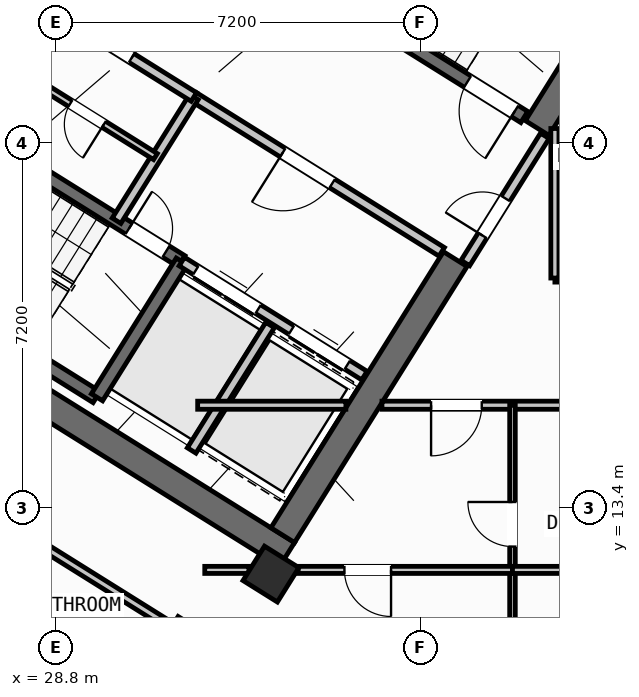
"""IFC4 building model, lengths in metres.
Left out: names, types, materials, properties, quantities, classifications, styles, units other than length and angle.
Written with IfcOpenShell. Run it as: python <this file> out.ifc"""

import sys

from ifc_helpers import new_model, si_unit, direction, frame, frame_2d, origin, origin_2d, place, context, subcontext, project, spatial, rectangle, hollow_rectangle, extrude, source, transform, mapped, element, fill, save


model = new_model("IFC4")
c1 = context("Model", 3, precision=1e-05, world=origin(), true_north=direction((0.0, 1.0)))
c2 = subcontext(c1, "Body", "Model", "MODEL_VIEW")
j1 = project(units=[si_unit("LENGTHUNIT", "METRE"), si_unit("PLANEANGLEUNIT", "RADIAN")], contexts=[c1])
p1 = place(None, origin())
s1 = spatial("IfcSite", under=j1, at=p1, CompositionType="ELEMENT")
p2 = place(p1, origin())
s2 = spatial("IfcBuilding", under=s1, at=p2, CompositionType="ELEMENT")
p3 = place(p2, frame((0.0, 0.0, 174.9)))
s3 = spatial("IfcBuildingStorey", under=s2, at=p3, CompositionType="ELEMENT", Elevation=174.9)
p4 = place(p3, frame((33.366, 12.477, 0.0), z_axis=(0.0, 0.0, 1.0), x_axis=(-0.848047359947, 0.529920442413, 0.0)))
e1 = element("IfcWall", 1, at=p4, inside=s3, PredefinedType="SHEAR", context=c2, shape_type="SweptSolid", body=[
    extrude(rectangle(XDim=13.14, YDim=0.55, at=frame_2d((6.57, 0.0))), origin(), (0.0, 0.0, 1.0), 4.22),
])
p5 = place(p3, frame((40.194, 23.922, 0.0), z_axis=(0.0, 0.0, 1.0), x_axis=(-0.529888438328, -0.848067357541, 0.0)))
e2 = element("IfcWall", 2, at=p5, inside=s3, PredefinedType="SHEAR", context=c2, shape_type="SweptSolid", body=[
    extrude(rectangle(XDim=3.575, YDim=0.55, at=frame_2d((1.788, 0.0))), origin(), (0.0, 0.0, 1.0), 4.22),
])
p6 = place(p3, frame((36.683, 18.304, 0.0), z_axis=(0.0, 0.0, 1.0), x_axis=(-0.529896466841, -0.848062341122, 0.0)))
e3 = element("IfcWall", 3, at=p6, inside=s3, PredefinedType="SHEAR", context=c2, shape_type="SweptSolid", body=[
    extrude(rectangle(XDim=6.425, YDim=0.55, at=frame_2d((3.212, 0.0))), origin(), (0.0, 0.0, 1.0), 4.22),
])
m1 = source(origin(), c2, "Body", "SweptSolid", [
    extrude(hollow_rectangle(XDim=0.8, YDim=0.8, WallThickness=0.032, at=origin_2d()), origin(), (0.0, 0.0, 1.0), 4.5),
])
p7 = place(p3, frame((33.046, 12.087, 0.0), z_axis=(0.0, 0.0, 1.0), x_axis=(-0.848048096156, 0.529919264233, 0.0)))
e4 = element("IfcColumn", 4, at=p7, inside=s3, PredefinedType="COLUMN", context=c2, shape_type="MappedRepresentation", body=[
    mapped(m1, transform((0.0, 0.0, 0.0), scale=1.0)),
])
p8 = place(p3, frame((29.268, 6.429, 0.0), z_axis=(0.0, 0.0, 1.0), x_axis=(-0.848049971435, 0.529916263149, 0.0)))
e5 = element("IfcWall", 5, at=p8, inside=s3, PredefinedType="STANDARD", context=c2, shape_type="SweptSolid", body=[
    extrude(rectangle(XDim=31.588, YDim=0.32, at=frame_2d((15.794, 0.0))), origin(), (0.0, 0.0, 1.0), 4.22),
])
p9 = place(p8, frame((27.641, 0.0, 0.0)))
e6 = element("IfcOpeningElement", 6, at=p9, cuts=e5, PredefinedType="OPENING", context=c2, shape_type="SweptSolid", body=[
    extrude(rectangle(XDim=1.2, YDim=2.15, at=frame_2d((0.6, 1.075))), frame((0.0, 0.17, 0.0), z_axis=(0.0, -1.0, 0.0), x_axis=(1.0, 0.0, 0.0)), (0.0, 0.0, 1.0), 0.34),
])
p10 = place(p8, frame((2.954, 0.0, 0.8)))
e7 = element("IfcOpeningElement", 7, at=p10, cuts=e5, PredefinedType="OPENING", context=c2, shape_type="SweptSolid", body=[
    extrude(rectangle(XDim=2.1, YDim=1.55, at=frame_2d((1.05, 0.775))), frame((0.0, 0.17, 0.0), z_axis=(0.0, -1.0, 0.0), x_axis=(1.0, 0.0, 0.0)), (0.0, 0.0, 1.0), 0.34),
])
p11 = place(p8, frame((8.253, 0.0, 0.8)))
e8 = element("IfcOpeningElement", 8, at=p11, cuts=e5, PredefinedType="OPENING", context=c2, shape_type="SweptSolid", body=[
    extrude(rectangle(XDim=2.1, YDim=1.55, at=frame_2d((1.05, 0.775))), frame((0.0, 0.17, 0.0), z_axis=(0.0, -1.0, 0.0), x_axis=(1.0, 0.0, 0.0)), (0.0, 0.0, 1.0), 0.34),
])
p12 = place(p8, frame((20.2, 0.0, 1.0)))
e9 = element("IfcOpeningElement", 9, at=p12, cuts=e5, PredefinedType="OPENING", context=c2, shape_type="SweptSolid", body=[
    extrude(rectangle(XDim=0.9, YDim=1.25, at=frame_2d((0.45, 0.625))), frame((0.0, 0.17, 0.0), z_axis=(0.0, -1.0, 0.0), x_axis=(1.0, 0.0, 0.0)), (0.0, 0.0, 1.0), 0.34),
])
p13 = place(p3, frame((29.605, 15.581, 0.0), z_axis=(0.0, 0.0, 1.0), x_axis=(-0.848036911448, 0.529937163087, 0.0)))
e10 = element("IfcWall", 10, at=p13, inside=s3, PredefinedType="SHEAR", context=c2, shape_type="SweptSolid", body=[
    extrude(rectangle(XDim=7.46, YDim=0.26, at=frame_2d((3.73, 0.0))), origin(), (0.0, 0.0, 1.0), 4.22),
])
p14 = place(p3, frame((31.28, 18.261, 0.0), z_axis=(0.0, 0.0, 1.0), x_axis=(-0.848051618787, 0.529913626805, 0.0)))
e11 = element("IfcWall", 11, at=p14, inside=s3, PredefinedType="SHEAR", context=c2, shape_type="SweptSolid", body=[
    extrude(rectangle(XDim=7.46, YDim=0.26, at=frame_2d((3.73, 0.0))), origin(), (0.0, 0.0, 1.0), 4.22),
])
p15 = place(p14, frame((0.36, 0.0, 0.0)))
e12 = element("IfcOpeningElement", 12, at=p15, cuts=e11, PredefinedType="OPENING", context=c2, shape_type="SweptSolid", body=[
    extrude(rectangle(XDim=0.86, YDim=2.05, at=frame_2d((0.43, 1.025))), frame((0.0, 0.14, 0.0), z_axis=(0.0, -1.0, 0.0), x_axis=(1.0, 0.0, 0.0)), (0.0, 0.0, 1.0), 0.28),
])
p16 = place(p3, frame((31.288, 18.256, 0.0), z_axis=(0.0, 0.0, 1.0), x_axis=(-0.529943379326, -0.848033026897, 0.0)))
e13 = element("IfcWall", 13, at=p16, inside=s3, PredefinedType="SHEAR", context=c2, shape_type="SweptSolid", body=[
    extrude(rectangle(XDim=3.16, YDim=0.26, at=frame_2d((1.58, 0.0))), origin(), (0.0, 0.0, 1.0), 4.22),
])
p17 = place(p3, frame((38.046, 21.108, 0.0), z_axis=(0.0, 0.0, 1.0), x_axis=(-0.848054434086, 0.529909121291, 0.0)))
e14 = element("IfcWall", 14, at=p17, inside=s3, PredefinedType="SHEAR", context=c2, shape_type="SweptSolid", body=[
    extrude(rectangle(XDim=7.33, YDim=0.26, at=frame_2d((3.665, 0.0))), origin(), (0.0, 0.0, 1.0), 4.22),
])
p18 = place(p17, frame((0.22, 0.0, 0.0)))
e15 = element("IfcOpeningElement", 15, at=p18, cuts=e14, PredefinedType="OPENING", context=c2, shape_type="SweptSolid", body=[
    extrude(rectangle(XDim=1.1, YDim=2.1, at=frame_2d((0.55, 1.05))), frame((0.0, 0.14, 0.0), z_axis=(0.0, -1.0, 0.0), x_axis=(1.0, 0.0, 0.0)), (0.0, 0.0, 1.0), 0.28),
])
p19 = place(p3, frame((34.891, 16.005, 0.0), z_axis=(0.0, 0.0, 1.0), x_axis=(-0.848062873452, 0.529895614884, 0.0)))
e16 = element("IfcWall", 16, at=p19, inside=s3, PredefinedType="STANDARD", context=c2, shape_type="SweptSolid", body=[
    extrude(rectangle(XDim=4.248, YDim=0.2, at=frame_2d((2.124, 0.0))), origin(), (0.0, 0.0, 1.0), 4.21),
])
p20 = place(p19, frame((0.398, 0.0, 0.0)))
e17 = element("IfcOpeningElement", 17, at=p20, cuts=e16, PredefinedType="OPENING", context=c2, shape_type="SweptSolid", body=[
    extrude(rectangle(XDim=1.3, YDim=2.2, at=frame_2d((0.65, 1.1))), frame((0.0, 0.11, 0.0), z_axis=(0.0, -1.0, 0.0), x_axis=(1.0, 0.0, 0.0)), (0.0, 0.0, 1.0), 0.22),
])
p21 = place(p19, frame((2.473, 0.0, 0.0)))
e18 = element("IfcOpeningElement", 18, at=p21, cuts=e16, PredefinedType="OPENING", context=c2, shape_type="SweptSolid", body=[
    extrude(rectangle(XDim=1.45, YDim=2.25, at=frame_2d((0.725, 1.125))), frame((0.0, 0.11, 0.0), z_axis=(0.0, -1.0, 0.0), x_axis=(1.0, 0.0, 0.0)), (0.0, 0.0, 1.0), 0.22),
])
p22 = place(p3, frame((36.417, 18.447, 0.0), z_axis=(0.0, 0.0, 1.0), x_axis=(-0.848064879198, 0.529892404805, 0.0)))
e19 = element("IfcWall", 19, at=p22, inside=s3, PredefinedType="STANDARD", context=c2, shape_type="SweptSolid", body=[
    extrude(rectangle(XDim=5.768, YDim=0.2, at=frame_2d((2.884, 0.0))), origin(), (0.0, 0.0, 1.0), 4.21),
])
p23 = place(p22, frame((2.548, 0.0, 0.0)))
e20 = element("IfcOpeningElement", 20, at=p23, cuts=e19, PredefinedType="OPENING", context=c2, shape_type="SweptSolid", body=[
    extrude(rectangle(XDim=1.15, YDim=2.1, at=frame_2d((0.575, 1.05))), frame((0.0, 0.11, 0.0), z_axis=(0.0, -1.0, 0.0), x_axis=(1.0, 0.0, 0.0)), (0.0, 0.0, 1.0), 0.22),
])
p24 = place(p3, frame((33.029, 17.003, 0.0), z_axis=(0.0, 0.0, 1.0), x_axis=(-0.529916267533, -0.848049968695, 0.0)))
e21 = element("IfcWall", 21, at=p24, inside=s3, PredefinedType="STANDARD", context=c2, shape_type="SweptSolid", body=[
    extrude(rectangle(XDim=2.92, YDim=0.2, at=frame_2d((1.46, 0.0))), origin(), (0.0, 0.0, 1.0), 4.21),
])
for number, where, z_axis, x_axis in (
    (22, (31.525, 21.504, 0.0), (0.0, 0.0, 1.0), (-0.53, -0.848, 0.0)),
    (23, (28.71, 23.263, 0.0), (0.0, 0.0, 1.0), (-0.53, -0.848, 0.0)),
):
    element("IfcWall", number, at=place(p3, frame(where, z_axis=z_axis, x_axis=x_axis)), inside=s3, PredefinedType="STANDARD", context=c2, shape_type="SweptSolid", body=[
        extrude(rectangle(XDim=2.88, YDim=0.2, at=frame_2d((1.44, 0.0))), origin(), (0.0, 0.0, 1.0), 4.21),
    ])
p25 = place(p3, frame((31.525, 21.504, 0.0), z_axis=(0.0, 0.0, 1.0), x_axis=(-0.848040211232, 0.529931882541, 0.0)))
e24 = element("IfcWall", 24, at=p25, inside=s3, PredefinedType="STANDARD", context=c2, shape_type="SweptSolid", body=[
    extrude(rectangle(XDim=6.218, YDim=0.2, at=frame_2d((3.109, 0.0))), origin(), (0.0, 0.0, 1.0), 4.21),
])
p26 = place(p25, frame((4.4, 0.0, 0.0)))
e25 = element("IfcOpeningElement", 25, at=p26, cuts=e24, PredefinedType="OPENING", context=c2, shape_type="SweptSolid", body=[
    extrude(rectangle(XDim=0.86, YDim=2.05, at=frame_2d((0.43, 1.025))), frame((0.0, 0.11, 0.0), z_axis=(0.0, -1.0, 0.0), x_axis=(1.0, 0.0, 0.0)), (0.0, 0.0, 1.0), 0.22),
])
p27 = place(p25, frame((1.45, 0.0, 0.0)))
e26 = element("IfcOpeningElement", 26, at=p27, cuts=e24, PredefinedType="OPENING", context=c2, shape_type="SweptSolid", body=[
    extrude(rectangle(XDim=0.86, YDim=2.05, at=frame_2d((0.43, 1.025))), frame((0.0, 0.11, 0.0), z_axis=(0.0, -1.0, 0.0), x_axis=(1.0, 0.0, 0.0)), (0.0, 0.0, 1.0), 0.22),
])
p28 = place(p3, frame((30.766, 20.327, 0.0), z_axis=(0.0, 0.0, 1.0), x_axis=(-0.848052663127, 0.529911955482, 0.0)))
e27 = element("IfcWall", 27, at=p28, inside=s3, PredefinedType="PLUMBINGWALL", context=c2, shape_type="SweptSolid", body=[
    extrude(rectangle(XDim=3.28, YDim=0.14, at=frame_2d((1.64, 0.0))), origin(), (0.0, 0.0, 1.0), 4.21),
])
p29 = place(p28, frame((1.2, 0.0, 0.0)))
e28 = element("IfcOpeningElement", 28, at=p29, cuts=e27, PredefinedType="OPENING", context=c2, shape_type="SweptSolid", body=[
    extrude(rectangle(XDim=0.78, YDim=2.05, at=frame_2d((0.39, 1.025))), frame((0.0, 0.08, 0.0), z_axis=(0.0, -1.0, 0.0), x_axis=(1.0, 0.0, 0.0)), (0.0, 0.0, 1.0), 0.16),
])
p30 = place(p3, frame((32.164, 10.374, 0.0), z_axis=(0.0, 0.0, 1.0), x_axis=(-0.848044107957, 0.529925646633, 0.0)))
e29 = element("IfcWall", 29, at=p30, inside=s3, PredefinedType="PARTITIONING", context=c2, shape_type="SweptSolid", body=[
    extrude(rectangle(XDim=15.57, YDim=0.16, at=frame_2d((7.785, 0.0))), origin(), (0.0, 0.0, 1.0), 4.21),
])
p31 = place(p30, frame((10.83, 0.0, 0.0)))
e30 = element("IfcOpeningElement", 30, at=p31, cuts=e29, PredefinedType="OPENING", context=c2, shape_type="SweptSolid", body=[
    extrude(rectangle(XDim=1.0, YDim=2.1, at=frame_2d((0.5, 1.05))), frame((0.0, 0.09, 0.0), z_axis=(0.0, -1.0, 0.0), x_axis=(1.0, 0.0, 0.0)), (0.0, 0.0, 1.0), 0.18),
])
p32 = place(p3, frame((31.282, 11.208, 0.0), z_axis=(0.0, 0.0, 1.0), x_axis=(-0.529938869374, -0.84803584519, 0.0)))
e31 = element("IfcWall", 31, at=p32, inside=s3, PredefinedType="PARTITIONING", context=c2, shape_type="SweptSolid", body=[
    extrude(rectangle(XDim=5.48, YDim=0.16, at=frame_2d((2.74, 0.0))), origin(), (0.0, 0.0, 1.0), 4.21),
])
p33 = place(p3, frame((29.72, 8.859, 0.0), z_axis=(0.0, 0.0, 1.0), x_axis=(-0.848049134363, 0.529917602752, 0.0)))
e32 = element("IfcWall", 32, at=p33, inside=s3, PredefinedType="PLUMBINGWALL", context=c2, shape_type="SweptSolid", body=[
    extrude(rectangle(XDim=14.3, YDim=0.14, at=frame_2d((7.15, 0.0))), origin(), (0.0, 0.0, 1.0), 4.21),
])
p34 = place(p33, frame((9.57, 0.0, 0.0)))
e33 = element("IfcOpeningElement", 33, at=p34, cuts=e32, PredefinedType="OPENING", context=c2, shape_type="SweptSolid", body=[
    extrude(rectangle(XDim=0.92, YDim=2.08, at=frame_2d((0.46, 1.04))), frame((0.0, 0.08, 0.0), z_axis=(0.0, -1.0, 0.0), x_axis=(1.0, 0.0, 0.0)), (0.0, 0.0, 1.0), 0.16),
])
p35 = place(p3, frame((38.451, 20.737, 0.0), z_axis=(0.0, 0.0, 1.0), x_axis=(-0.529924799939, -0.848044637038, 0.0)))
e34 = element("IfcWall", 34, at=p35, inside=s3, PredefinedType="STANDARD", context=c2, shape_type="SweptSolid", body=[
    extrude(rectangle(XDim=2.96, YDim=0.2, at=frame_2d((1.48, 0.0))), origin(), (0.0, 0.0, 1.0), 2.395),
])
p36 = place(p35, frame((1.46, 0.0, 0.0)))
e35 = element("IfcOpeningElement", 35, at=p36, cuts=e34, PredefinedType="OPENING", context=c2, shape_type="SweptSolid", body=[
    extrude(rectangle(XDim=0.86, YDim=2.05, at=frame_2d((0.43, 1.025))), frame((0.0, 0.11, 0.0), z_axis=(0.0, -1.0, 0.0), x_axis=(1.0, 0.0, 0.0)), (0.0, 0.0, 1.0), 0.22),
])
p37 = place(p3, frame((31.6, 15.42, 0.0), z_axis=(0.0, 0.0, 1.0), x_axis=(1.0, 0.0, 0.0)))
e36 = element("IfcWall", 36, at=p37, inside=s3, PredefinedType="PARTITIONING", context=c2, shape_type="SweptSolid", body=[
    extrude(rectangle(XDim=2.925, YDim=0.16, at=frame_2d((1.462, 0.0))), origin(), (0.0, 0.0, 1.0), 4.21),
])
p38 = place(p3, frame((35.237, 15.42, 0.0), z_axis=(0.0, 0.0, 1.0), x_axis=(1.0, 0.0, 0.0)))
e37 = element("IfcWall", 37, at=p38, inside=s3, PredefinedType="PARTITIONING", context=c2, shape_type="SweptSolid", body=[
    extrude(rectangle(XDim=15.432, YDim=0.16, at=frame_2d((7.716, 0.0))), origin(), (0.0, 0.0, 1.0), 4.21),
])
p39 = place(p38, frame((0.969, 0.0, 0.0)))
e38 = element("IfcOpeningElement", 38, at=p39, cuts=e37, PredefinedType="OPENING", context=c2, shape_type="SweptSolid", body=[
    extrude(rectangle(XDim=1.0, YDim=2.1, at=frame_2d((0.5, 1.05))), frame((0.0, 0.09, 0.0), z_axis=(0.0, -1.0, 0.0), x_axis=(1.0, 0.0, 0.0)), (0.0, 0.0, 1.0), 0.18),
])
p40 = place(p38, frame((8.799, 0.0, 0.0)))
e39 = element("IfcOpeningElement", 39, at=p40, cuts=e37, PredefinedType="OPENING", context=c2, shape_type="SweptSolid", body=[
    extrude(rectangle(XDim=1.0, YDim=2.1, at=frame_2d((0.5, 1.05))), frame((0.0, 0.09, 0.0), z_axis=(0.0, -1.0, 0.0), x_axis=(1.0, 0.0, 0.0)), (0.0, 0.0, 1.0), 0.18),
])
p41 = place(p3, frame((38.65, 17.93, 0.0), z_axis=(0.0, 0.0, 1.0), x_axis=(1.0, 0.0, 0.0)))
e40 = element("IfcWall", 40, at=p41, inside=s3, PredefinedType="PARTITIONING", context=c2, shape_type="SweptSolid", body=[
    extrude(rectangle(XDim=9.95, YDim=0.16, at=frame_2d((4.975, 0.0))), origin(), (0.0, 0.0, 1.0), 4.21),
])
p42 = place(p41, frame((4.475, 0.0, 0.0)))
e41 = element("IfcOpeningElement", 41, at=p42, cuts=e40, PredefinedType="OPENING", context=c2, shape_type="SweptSolid", body=[
    extrude(rectangle(XDim=1.0, YDim=2.1, at=frame_2d((0.5, 1.05))), frame((0.0, 0.09, 0.0), z_axis=(0.0, -1.0, 0.0), x_axis=(1.0, 0.0, 0.0)), (0.0, 0.0, 1.0), 0.18),
])
p43 = place(p3, frame((38.65, 17.93, 0.0), z_axis=(0.0, 0.0, 1.0), x_axis=(0.0, 1.0, 0.0)))
e42 = element("IfcWall", 42, at=p43, inside=s3, PredefinedType="PARTITIONING", context=c2, shape_type="SweptSolid", body=[
    extrude(rectangle(XDim=2.951, YDim=0.16, at=frame_2d((1.476, 0.0))), origin(), (0.0, 0.0, 1.0), 4.21),
])
p44 = place(p3, frame((37.813, 1.96, 0.0), z_axis=(0.0, 0.0, 1.0), x_axis=(0.0, 1.0, 0.0)))
e43 = element("IfcWall", 43, at=p44, inside=s3, PredefinedType="PARTITIONING", context=c2, shape_type="SweptSolid", body=[
    extrude(rectangle(XDim=13.46, YDim=0.11, at=frame_2d((6.73, 0.0))), origin(), (0.0, 0.0, 1.0), 4.21),
])
p45 = place(p44, frame((5.5, 0.0, 0.0)))
e44 = element("IfcOpeningElement", 44, at=p45, cuts=e43, PredefinedType="OPENING", context=c2, shape_type="SweptSolid", body=[
    extrude(rectangle(XDim=0.92, YDim=2.08, at=frame_2d((0.46, 1.04))), frame((0.0, 0.065, 0.0), z_axis=(0.0, -1.0, 0.0), x_axis=(1.0, 0.0, 0.0)), (0.0, 0.0, 1.0), 0.13),
])
p46 = place(p44, frame((10.67, 0.0, 0.0)))
e45 = element("IfcOpeningElement", 45, at=p46, cuts=e43, PredefinedType="OPENING", context=c2, shape_type="SweptSolid", body=[
    extrude(rectangle(XDim=0.88, YDim=2.08, at=frame_2d((0.44, 1.04))), frame((0.0, 0.065, 0.0), z_axis=(0.0, -1.0, 0.0), x_axis=(1.0, 0.0, 0.0)), (0.0, 0.0, 1.0), 0.13),
])
p47 = place(p3, frame((31.74, 12.17, 0.0), z_axis=(0.0, 0.0, 1.0), x_axis=(1.0, 0.0, 0.0)))
e46 = element("IfcWall", 46, at=p47, inside=s3, PredefinedType="PLUMBINGWALL", context=c2, shape_type="SweptSolid", body=[
    extrude(rectangle(XDim=0.872, YDim=0.14, at=frame_2d((0.436, 0.0))), origin(), (0.0, 0.0, 1.0), 4.21),
])
p48 = place(p3, frame((33.584, 12.17, 0.0), z_axis=(0.0, 0.0, 1.0), x_axis=(1.0, 0.0, 0.0)))
e47 = element("IfcWall", 47, at=p48, inside=s3, PredefinedType="PLUMBINGWALL", context=c2, shape_type="SweptSolid", body=[
    extrude(rectangle(XDim=4.229, YDim=0.14, at=frame_2d((2.115, 0.0))), origin(), (0.0, 0.0, 1.0), 3.395),
])
p49 = place(p48, frame((0.913, 0.0, 0.0)))
e48 = element("IfcOpeningElement", 48, at=p49, cuts=e47, PredefinedType="OPENING", context=c2, shape_type="SweptSolid", body=[
    extrude(rectangle(XDim=0.92, YDim=2.08, at=frame_2d((0.46, 1.04))), frame((0.0, 0.08, 0.0), z_axis=(0.0, -1.0, 0.0), x_axis=(1.0, 0.0, 0.0)), (0.0, 0.0, 1.0), 0.16),
])
p50 = place(p3, frame((37.813, 12.17, 0.0), z_axis=(0.0, 0.0, 1.0), x_axis=(1.0, 0.0, 0.0)))
e49 = element("IfcWall", 49, at=p50, inside=s3, PredefinedType="PLUMBINGWALL", context=c2, shape_type="SweptSolid", body=[
    extrude(rectangle(XDim=4.137, YDim=0.14, at=frame_2d((2.068, 0.0))), origin(), (0.0, 0.0, 1.0), 3.395),
])
m2 = source(origin(), c2, "Body", "SweptSolid", [
    extrude(rectangle(XDim=0.86, YDim=2.05, at=frame_2d((0.43, 1.025))), frame((0.0, 0.025, 0.0), z_axis=(0.0, -1.0, 0.0), x_axis=(1.0, 0.0, 0.0)), (0.0, 0.0, 1.0), 0.05),
])
p51 = place(p15, frame((0.86, 0.0, 0.0), z_axis=(0.0, 0.0, 1.0), x_axis=(-1.0, 0.0, 0.0)))
e50 = element("IfcDoor", 50, at=p51, inside=s3, OperationType="SINGLE_SWING_LEFT", PredefinedType="DOOR", context=c2, shape_type="MappedRepresentation", body=[
    mapped(m2, transform((0.0, 0.0, 0.0), scale=1.0)),
])
fill(e12, e50)
m3 = source(origin(), c2, "Body", "SweptSolid", [
    extrude(rectangle(XDim=1.1, YDim=2.1, at=frame_2d((0.55, 1.05))), frame((0.0, 0.025, 0.0), z_axis=(0.0, -1.0, 0.0), x_axis=(1.0, 0.0, 0.0)), (0.0, 0.0, 1.0), 0.05),
])
p52 = place(p18, origin())
e51 = element("IfcDoor", 51, at=p52, inside=s3, OperationType="SINGLE_SWING_LEFT", PredefinedType="DOOR", context=c2, shape_type="MappedRepresentation", body=[
    mapped(m3, transform((0.0, 0.0, 0.0), scale=1.0)),
])
fill(e15, e51)
m4 = source(origin(), c2, "Body", "SweptSolid", [
    extrude(rectangle(XDim=1.15, YDim=2.1, at=frame_2d((0.575, 1.05))), frame((0.0, 0.025, 0.0), z_axis=(0.0, -1.0, 0.0), x_axis=(1.0, 0.0, 0.0)), (0.0, 0.0, 1.0), 0.05),
])
p53 = place(p23, origin())
e52 = element("IfcDoor", 52, at=p53, inside=s3, OperationType="SINGLE_SWING_RIGHT", PredefinedType="DOOR", context=c2, shape_type="MappedRepresentation", body=[
    mapped(m4, transform((0.0, 0.0, 0.0), scale=1.0)),
])
fill(e20, e52)
m5 = source(origin(), c2, "Body", "SweptSolid", [
    extrude(rectangle(XDim=1.3, YDim=2.2, at=frame_2d((0.65, 1.1))), frame((0.0, 0.025, 0.0), z_axis=(0.0, -1.0, 0.0), x_axis=(1.0, 0.0, 0.0)), (0.0, 0.0, 1.0), 0.05),
])
p54 = place(p20, origin())
e53 = element("IfcDoor", 53, at=p54, inside=s3, OperationType="DOUBLE_DOOR_SLIDING", PredefinedType="DOOR", context=c2, shape_type="MappedRepresentation", body=[
    mapped(m5, transform((0.0, 0.0, 0.0), scale=1.0)),
])
fill(e17, e53)
m6 = source(origin(), c2, "Body", "SweptSolid", [
    extrude(rectangle(XDim=1.45, YDim=2.25, at=frame_2d((0.725, 1.125))), frame((0.0, 0.025, 0.0), z_axis=(0.0, -1.0, 0.0), x_axis=(1.0, 0.0, 0.0)), (0.0, 0.0, 1.0), 0.05),
])
p55 = place(p21, origin())
e54 = element("IfcDoor", 54, at=p55, inside=s3, OperationType="DOUBLE_DOOR_SLIDING", PredefinedType="DOOR", context=c2, shape_type="MappedRepresentation", body=[
    mapped(m6, transform((0.0, 0.0, 0.0), scale=1.0)),
])
fill(e18, e54)
p56 = place(p27, frame((0.86, 0.0, 0.0), z_axis=(0.0, 0.0, 1.0), x_axis=(-1.0, 0.0, 0.0)))
e55 = element("IfcDoor", 55, at=p56, inside=s3, OperationType="SINGLE_SWING_RIGHT", PredefinedType="DOOR", context=c2, shape_type="MappedRepresentation", body=[
    mapped(m2, transform((0.0, 0.0, 0.0), scale=1.0)),
])
fill(e26, e55)
m7 = source(origin(), c2, "Body", "SweptSolid", [
    extrude(rectangle(XDim=0.78, YDim=2.05, at=frame_2d((0.39, 1.025))), frame((0.0, 0.025, 0.0), z_axis=(0.0, -1.0, 0.0), x_axis=(1.0, 0.0, 0.0)), (0.0, 0.0, 1.0), 0.05),
])
p57 = place(p29, origin())
e56 = element("IfcDoor", 56, at=p57, inside=s3, OperationType="SINGLE_SWING_LEFT", PredefinedType="DOOR", context=c2, shape_type="MappedRepresentation", body=[
    mapped(m7, transform((0.0, 0.0, 0.0), scale=1.0)),
])
fill(e28, e56)
p58 = place(p36, frame((0.86, 0.0, 0.0), z_axis=(0.0, 0.0, 1.0), x_axis=(-1.0, 0.0, 0.0)))
e57 = element("IfcDoor", 57, at=p58, inside=s3, OperationType="SINGLE_SWING_LEFT", PredefinedType="DOOR", context=c2, shape_type="MappedRepresentation", body=[
    mapped(m2, transform((0.0, 0.0, 0.0), scale=1.0)),
])
fill(e35, e57)
m8 = source(origin(), c2, "Body", "SweptSolid", [
    extrude(rectangle(XDim=1.0, YDim=2.1, at=frame_2d((0.5, 1.05))), frame((0.0, 0.025, 0.0), z_axis=(0.0, -1.0, 0.0), x_axis=(1.0, 0.0, 0.0)), (0.0, 0.0, 1.0), 0.05),
])
p59 = place(p39, frame((1.0, 0.0, 0.0), z_axis=(0.0, 0.0, 1.0), x_axis=(-1.0, 0.0, 0.0)))
e58 = element("IfcDoor", 58, at=p59, inside=s3, OperationType="SINGLE_SWING_RIGHT", PredefinedType="DOOR", context=c2, shape_type="MappedRepresentation", body=[
    mapped(m8, transform((0.0, 0.0, 0.0), scale=1.0)),
])
fill(e38, e58)
m9 = source(origin(), c2, "Body", "SweptSolid", [
    extrude(rectangle(XDim=0.92, YDim=2.08, at=frame_2d((0.46, 1.04))), frame((0.0, 0.025, 0.0), z_axis=(0.0, -1.0, 0.0), x_axis=(1.0, 0.0, 0.0)), (0.0, 0.0, 1.0), 0.05),
])
p60 = place(p49, frame((0.92, 0.0, 0.0), z_axis=(0.0, 0.0, 1.0), x_axis=(-1.0, 0.0, 0.0)))
e59 = element("IfcDoor", 59, at=p60, inside=s3, OperationType="SINGLE_SWING_LEFT", PredefinedType="DOOR", context=c2, shape_type="MappedRepresentation", body=[
    mapped(m9, transform((0.0, 0.0, 0.0), scale=1.0)),
])
fill(e48, e59)
m10 = source(origin(), c2, "Body", "SweptSolid", [
    extrude(rectangle(XDim=0.88, YDim=2.08, at=frame_2d((0.44, 1.04))), frame((0.0, 0.025, 0.0), z_axis=(0.0, -1.0, 0.0), x_axis=(1.0, 0.0, 0.0)), (0.0, 0.0, 1.0), 0.05),
])
p61 = place(p46, origin())
e60 = element("IfcDoor", 60, at=p61, inside=s3, OperationType="SINGLE_SWING_RIGHT", PredefinedType="DOOR", context=c2, shape_type="MappedRepresentation", body=[
    mapped(m10, transform((0.0, 0.0, 0.0), scale=1.0)),
])
fill(e45, e60)
save(model, sys.argv[1])
